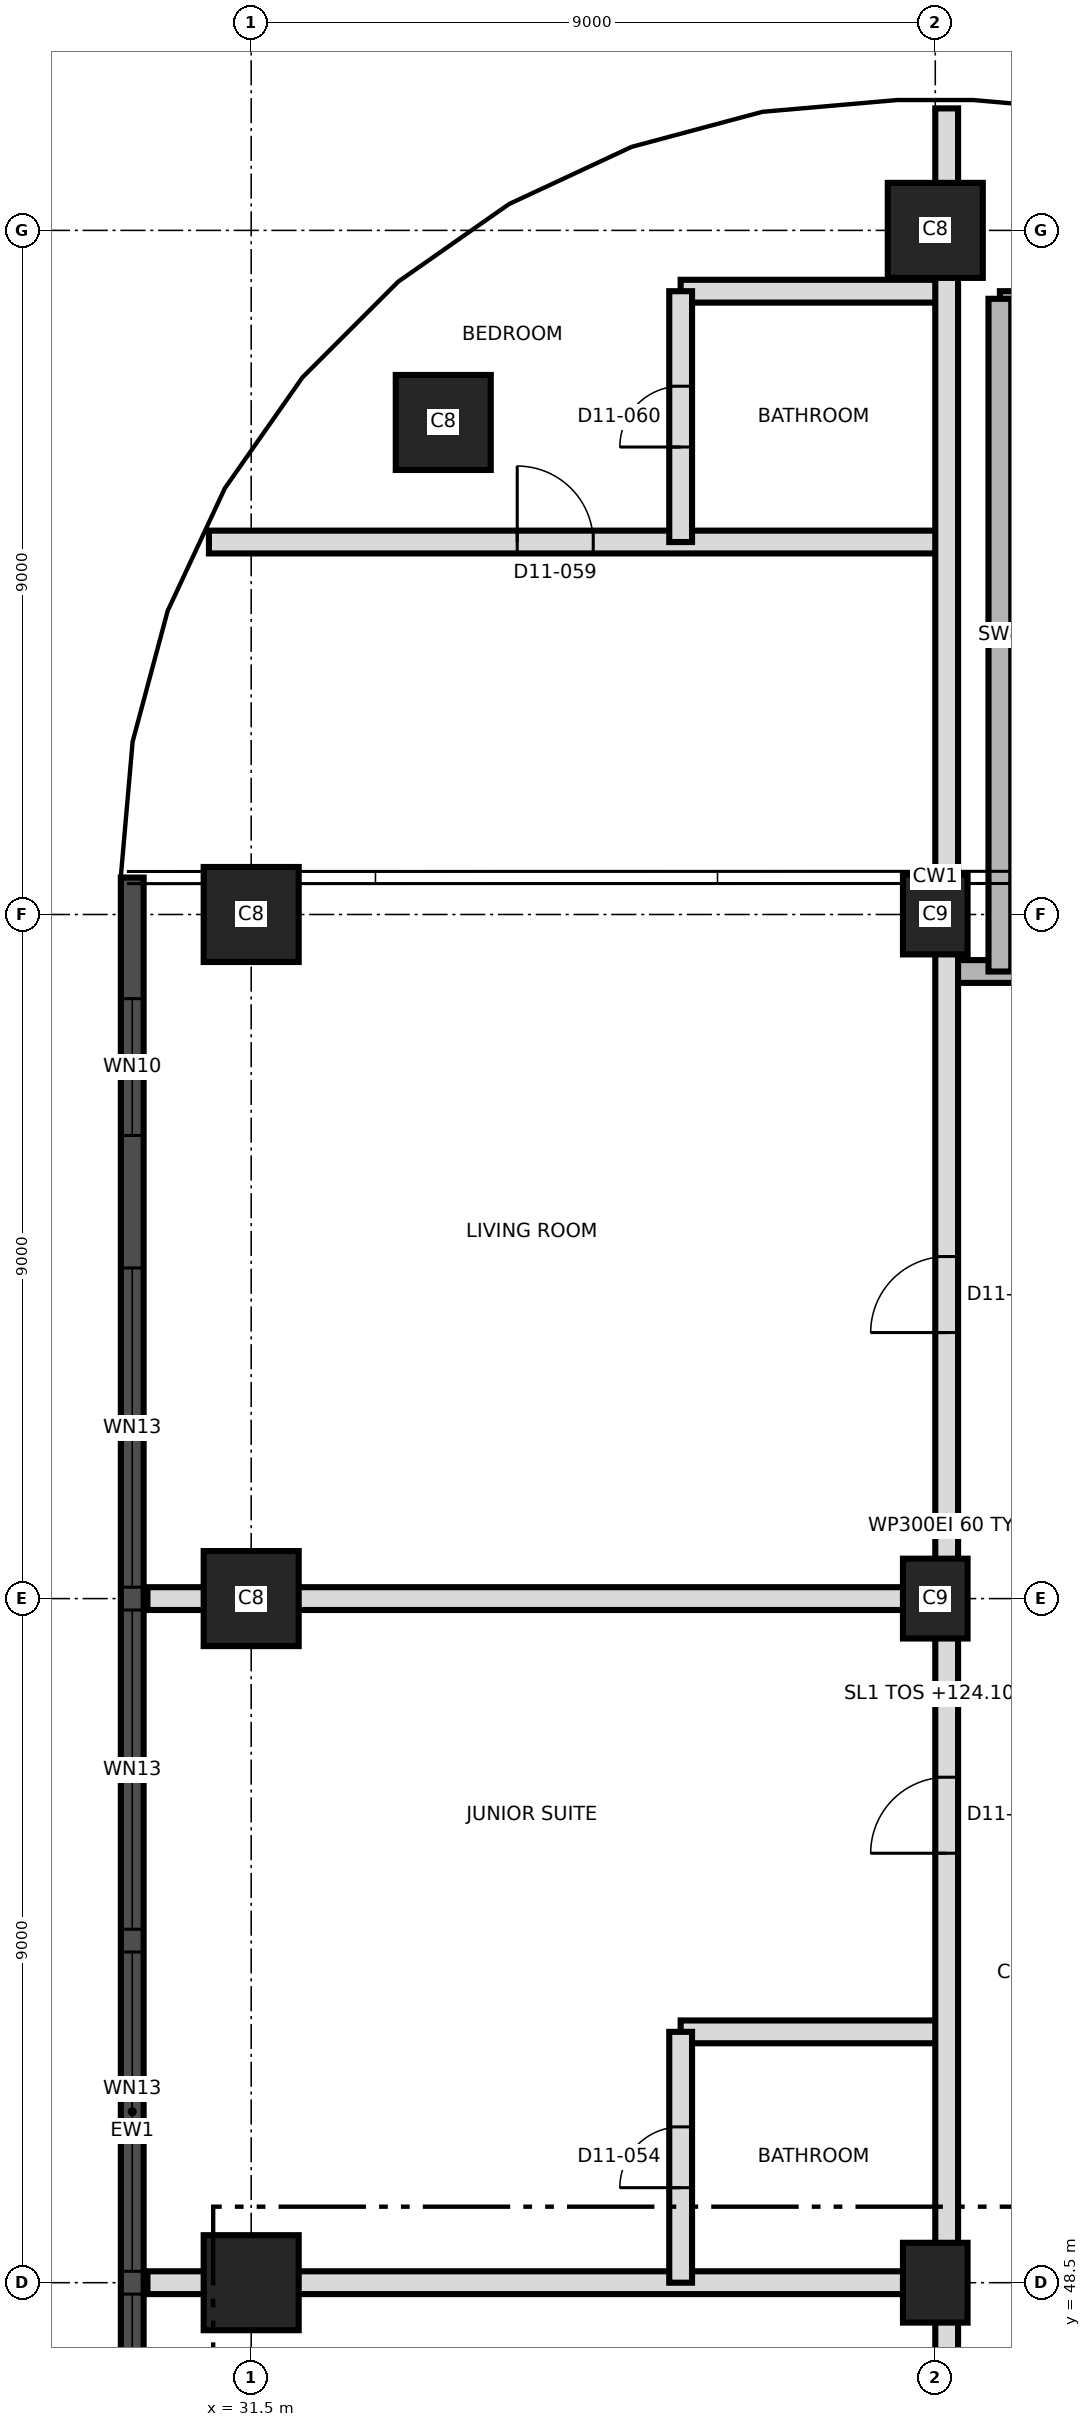
"""IFC4 building model, lengths in metres.
Left out: names, types, materials, properties, quantities, classifications, styles, units other than length and angle.
Written with IfcOpenShell. Run it as: python <this file> out.ifc"""

import sys

from ifc_helpers import new_model, si_unit, direction, frame, frame_2d, origin, origin_2d, place, context, subcontext, project, spatial, rectangle, extrude, element, fill, save


model = new_model("IFC4")
c1 = context("Model", 3, precision=1e-05, world=origin(), true_north=direction((0.0, 1.0)))
c2 = subcontext(c1, "Body", "Model", "MODEL_VIEW")
j1 = project(units=[si_unit("LENGTHUNIT", "METRE"), si_unit("PLANEANGLEUNIT", "RADIAN")], contexts=[c1])
p1 = place(None, origin())
s1 = spatial("IfcSite", under=j1, at=p1, CompositionType="ELEMENT")
p2 = place(p1, origin())
s2 = spatial("IfcBuilding", under=s1, at=p2, CompositionType="ELEMENT")
p3 = place(p2, frame((0.0, 0.0, 124.1)))
s3 = spatial("IfcBuildingStorey", under=s2, at=p3, CompositionType="ELEMENT", Elevation=124.1)
p4 = place(p3, frame((31.5, 48.5, 0.0), z_axis=(0.0, 0.0, 1.0), x_axis=(1.0, 0.0, 0.0)))
e1 = element("IfcColumn", 1, at=p4, inside=s3, PredefinedType="COLUMN", context=c2, shape_type="SweptSolid", body=[
    extrude(rectangle(XDim=1.25, YDim=1.25, at=origin_2d()), origin(), (0.0, 0.0, 1.0), 3.7),
])
p5 = place(p3, frame((40.5, 48.5, 0.0), z_axis=(0.0, 0.0, 1.0), x_axis=(0.0, 1.0, 0.0)))
e2 = element("IfcColumn", 2, at=p5, inside=s3, PredefinedType="COLUMN", context=c2, shape_type="SweptSolid", body=[
    extrude(rectangle(XDim=1.05, YDim=0.85, at=origin_2d()), origin(), (0.0, 0.0, 1.0), 3.7),
])
p6 = place(p3, frame((31.5, 57.5, 0.0), z_axis=(0.0, 0.0, 1.0), x_axis=(1.0, 0.0, 0.0)))
e3 = element("IfcColumn", 3, at=p6, inside=s3, PredefinedType="COLUMN", context=c2, shape_type="SweptSolid", body=[
    extrude(rectangle(XDim=1.25, YDim=1.25, at=origin_2d()), origin(), (0.0, 0.0, 1.0), 3.7),
])
p7 = place(p3, frame((40.5, 57.5, 0.0), z_axis=(0.0, 0.0, 1.0), x_axis=(0.0, 1.0, 0.0)))
e4 = element("IfcColumn", 4, at=p7, inside=s3, PredefinedType="COLUMN", context=c2, shape_type="SweptSolid", body=[
    extrude(rectangle(XDim=1.05, YDim=0.85, at=origin_2d()), origin(), (0.0, 0.0, 1.0), 3.7),
])
p8 = place(p3, frame((31.5, 66.5, 0.0), z_axis=(0.0, 0.0, 1.0), x_axis=(1.0, 0.0, 0.0)))
e5 = element("IfcColumn", 5, at=p8, inside=s3, PredefinedType="COLUMN", context=c2, shape_type="SweptSolid", body=[
    extrude(rectangle(XDim=1.25, YDim=1.25, at=origin_2d()), origin(), (0.0, 0.0, 1.0), 3.7),
])
p9 = place(p3, frame((40.5, 66.5, 0.0), z_axis=(0.0, 0.0, 1.0), x_axis=(0.0, 1.0, 0.0)))
e6 = element("IfcColumn", 6, at=p9, inside=s3, PredefinedType="COLUMN", context=c2, shape_type="SweptSolid", body=[
    extrude(rectangle(XDim=1.05, YDim=0.85, at=origin_2d()), origin(), (0.0, 0.0, 1.0), 3.7),
])
for number, where, z_axis, x_axis in (
    (7, (34.027, 72.973, 0.0), (0.0, 0.0, 1.0), (1.0, 0.0, 0.0)),
    (8, (40.5, 75.5, 0.0), (0.0, 0.0, 1.0), (1.0, 0.0, 0.0)),
):
    element("IfcColumn", number, at=place(p3, frame(where, z_axis=z_axis, x_axis=x_axis)), inside=s3, PredefinedType="COLUMN", context=c2, shape_type="SweptSolid", body=[
        extrude(rectangle(XDim=1.25, YDim=1.25, at=origin_2d()), origin(), (0.0, 0.0, 1.0), 3.7),
    ])
p10 = place(p3, frame((29.935, 66.986, 0.0), z_axis=(0.0, 0.0, 1.0), x_axis=(0.0, -1.0, 0.0)))
e9 = element("IfcWall", 9, at=p10, inside=s3, PredefinedType="SOLIDWALL", context=c2, shape_type="SweptSolid", body=[
    extrude(rectangle(XDim=32.976, YDim=0.3, at=frame_2d((16.488, 0.0))), origin(), (0.0, 0.0, 1.0), 3.4),
])
p11 = place(p10, frame((1.593, 0.0, 0.3)))
e10 = element("IfcOpeningElement", 10, at=p11, cuts=e9, PredefinedType="OPENING", context=c2, shape_type="SweptSolid", body=[
    extrude(rectangle(XDim=1.8, YDim=2.4, at=frame_2d((0.9, 1.2))), frame((0.0, 0.16, 0.0), z_axis=(0.0, -1.0, 0.0), x_axis=(1.0, 0.0, 0.0)), (0.0, 0.0, 1.0), 0.32),
])
p12 = place(p10, frame((5.136, 0.0, 0.9)))
e11 = element("IfcOpeningElement", 11, at=p12, cuts=e9, PredefinedType="OPENING", context=c2, shape_type="SweptSolid", body=[
    extrude(rectangle(XDim=4.2, YDim=1.7, at=frame_2d((2.1, 0.85))), frame((0.0, 0.16, 0.0), z_axis=(0.0, -1.0, 0.0), x_axis=(1.0, 0.0, 0.0)), (0.0, 0.0, 1.0), 0.32),
])
p13 = place(p10, frame((9.636, 0.0, 0.9)))
e12 = element("IfcOpeningElement", 12, at=p13, cuts=e9, PredefinedType="OPENING", context=c2, shape_type="SweptSolid", body=[
    extrude(rectangle(XDim=4.2, YDim=1.7, at=frame_2d((2.1, 0.85))), frame((0.0, 0.16, 0.0), z_axis=(0.0, -1.0, 0.0), x_axis=(1.0, 0.0, 0.0)), (0.0, 0.0, 1.0), 0.32),
])
p14 = place(p10, frame((14.136, 0.0, 0.9)))
e13 = element("IfcOpeningElement", 13, at=p14, cuts=e9, PredefinedType="OPENING", context=c2, shape_type="SweptSolid", body=[
    extrude(rectangle(XDim=4.2, YDim=1.7, at=frame_2d((2.1, 0.85))), frame((0.0, 0.16, 0.0), z_axis=(0.0, -1.0, 0.0), x_axis=(1.0, 0.0, 0.0)), (0.0, 0.0, 1.0), 0.32),
])
p15 = place(p10, frame((18.636, 0.0, 0.9)))
e14 = element("IfcOpeningElement", 14, at=p15, cuts=e9, PredefinedType="OPENING", context=c2, shape_type="SweptSolid", body=[
    extrude(rectangle(XDim=4.2, YDim=1.7, at=frame_2d((2.1, 0.85))), frame((0.0, 0.16, 0.0), z_axis=(0.0, -1.0, 0.0), x_axis=(1.0, 0.0, 0.0)), (0.0, 0.0, 1.0), 0.32),
])
p16 = place(p10, frame((23.136, 0.0, 0.9)))
e15 = element("IfcOpeningElement", 15, at=p16, cuts=e9, PredefinedType="OPENING", context=c2, shape_type="SweptSolid", body=[
    extrude(rectangle(XDim=4.2, YDim=1.7, at=frame_2d((2.1, 0.85))), frame((0.0, 0.16, 0.0), z_axis=(0.0, -1.0, 0.0), x_axis=(1.0, 0.0, 0.0)), (0.0, 0.0, 1.0), 0.32),
])
p17 = place(p10, frame((29.331, 0.0, 0.3)))
e16 = element("IfcOpeningElement", 16, at=p17, cuts=e9, PredefinedType="OPENING", context=c2, shape_type="SweptSolid", body=[
    extrude(rectangle(XDim=1.8, YDim=2.4, at=frame_2d((0.9, 1.2))), frame((0.0, 0.16, 0.0), z_axis=(0.0, -1.0, 0.0), x_axis=(1.0, 0.0, 0.0)), (0.0, 0.0, 1.0), 0.32),
])
p18 = place(p3, frame((30.135, 48.5, 0.0), z_axis=(0.0, 0.0, 1.0), x_axis=(1.0, 0.0, 0.0)))
e17 = element("IfcWall", 17, at=p18, inside=s3, PredefinedType="PARTITIONING", context=c2, shape_type="SweptSolid", body=[
    extrude(rectangle(XDim=10.515, YDim=0.3, at=frame_2d((5.257, 0.0))), origin(), (0.0, 0.0, 1.0), 3.4),
])
p19 = place(p3, frame((37.15, 51.8, 0.0), z_axis=(0.0, 0.0, 1.0), x_axis=(1.0, 0.0, 0.0)))
e18 = element("IfcWall", 18, at=p19, inside=s3, PredefinedType="PARTITIONING", context=c2, shape_type="SweptSolid", body=[
    extrude(rectangle(XDim=3.5, YDim=0.3, at=frame_2d((1.75, 0.0))), origin(), (0.0, 0.0, 1.0), 3.4),
])
p20 = place(p3, frame((30.135, 57.5, 0.0), z_axis=(0.0, 0.0, 1.0), x_axis=(1.0, 0.0, 0.0)))
e19 = element("IfcWall", 19, at=p20, inside=s3, PredefinedType="PARTITIONING", context=c2, shape_type="SweptSolid", body=[
    extrude(rectangle(XDim=10.515, YDim=0.3, at=frame_2d((5.257, 0.0))), origin(), (0.0, 0.0, 1.0), 3.4),
])
p21 = place(p3, frame((40.65, 65.75, 0.0), z_axis=(0.0, 0.0, 1.0), x_axis=(1.0, 0.0, 0.0)))
e20 = element("IfcWall", 20, at=p21, inside=s3, PredefinedType="SHEAR", context=c2, shape_type="SweptSolid", body=[
    extrude(rectangle(XDim=3.7, YDim=0.3, at=frame_2d((1.85, 0.0))), origin(), (0.0, 0.0, 1.0), 3.4),
])
p22 = place(p21, frame((1.1, 0.0, 0.0)))
e21 = element("IfcOpeningElement", 21, at=p22, cuts=e20, PredefinedType="OPENING", context=c2, shape_type="SweptSolid", body=[
    extrude(rectangle(XDim=1.2, YDim=2.1, at=frame_2d((0.6, 1.05))), frame((0.0, 0.16, 0.0), z_axis=(0.0, -1.0, 0.0), x_axis=(1.0, 0.0, 0.0)), (0.0, 0.0, 1.0), 0.32),
])
p23 = place(p3, frame((30.944, 71.4, 0.0), z_axis=(0.0, 0.0, 1.0), x_axis=(1.0, 0.0, 0.0)))
e22 = element("IfcWall", 22, at=p23, inside=s3, PredefinedType="PARTITIONING", context=c2, shape_type="SweptSolid", body=[
    extrude(rectangle(XDim=9.706, YDim=0.3, at=frame_2d((4.853, 0.0))), origin(), (0.0, 0.0, 1.0), 3.4),
])
p24 = place(p23, frame((4.056, 0.0, 0.0)))
e23 = element("IfcOpeningElement", 23, at=p24, cuts=e22, PredefinedType="OPENING", context=c2, shape_type="SweptSolid", body=[
    extrude(rectangle(XDim=1.0, YDim=2.1, at=frame_2d((0.5, 1.05))), frame((0.0, 0.16, 0.0), z_axis=(0.0, -1.0, 0.0), x_axis=(1.0, 0.0, 0.0)), (0.0, 0.0, 1.0), 0.32),
])
p25 = place(p3, frame((41.35, 74.55, 0.0), z_axis=(0.0, 0.0, 1.0), x_axis=(1.0, 0.0, 0.0)))
e24 = element("IfcWall", 24, at=p25, inside=s3, PredefinedType="SHEAR", context=c2, shape_type="SweptSolid", body=[
    extrude(rectangle(XDim=3.0, YDim=0.3, at=frame_2d((1.5, 0.0))), origin(), (0.0, 0.0, 1.0), 3.4),
])
p26 = place(p3, frame((37.15, 74.7, 0.0), z_axis=(0.0, 0.0, 1.0), x_axis=(1.0, 0.0, 0.0)))
e25 = element("IfcWall", 25, at=p26, inside=s3, PredefinedType="PARTITIONING", context=c2, shape_type="SweptSolid", body=[
    extrude(rectangle(XDim=3.5, YDim=0.3, at=frame_2d((1.75, 0.0))), origin(), (0.0, 0.0, 1.0), 3.4),
])
p27 = place(p3, frame((37.15, 48.5, 0.0), z_axis=(0.0, 0.0, 1.0), x_axis=(0.0, 1.0, 0.0)))
e26 = element("IfcWall", 26, at=p27, inside=s3, PredefinedType="PARTITIONING", context=c2, shape_type="SweptSolid", body=[
    extrude(rectangle(XDim=3.3, YDim=0.3, at=frame_2d((1.65, 0.0))), origin(), (0.0, 0.0, 1.0), 3.4),
])
p28 = place(p27, frame((1.25, 0.0, 0.0)))
e27 = element("IfcOpeningElement", 27, at=p28, cuts=e26, PredefinedType="OPENING", context=c2, shape_type="SweptSolid", body=[
    extrude(rectangle(XDim=0.8, YDim=2.1, at=frame_2d((0.4, 1.05))), frame((0.0, 0.16, 0.0), z_axis=(0.0, -1.0, 0.0), x_axis=(1.0, 0.0, 0.0)), (0.0, 0.0, 1.0), 0.32),
])
p29 = place(p3, frame((37.15, 71.4, 0.0), z_axis=(0.0, 0.0, 1.0), x_axis=(0.0, 1.0, 0.0)))
e28 = element("IfcWall", 28, at=p29, inside=s3, PredefinedType="PARTITIONING", context=c2, shape_type="SweptSolid", body=[
    extrude(rectangle(XDim=3.3, YDim=0.3, at=frame_2d((1.65, 0.0))), origin(), (0.0, 0.0, 1.0), 3.4),
])
p30 = place(p29, frame((1.25, 0.0, 0.0)))
e29 = element("IfcOpeningElement", 29, at=p30, cuts=e28, PredefinedType="OPENING", context=c2, shape_type="SweptSolid", body=[
    extrude(rectangle(XDim=0.8, YDim=2.1, at=frame_2d((0.4, 1.05))), frame((0.0, 0.16, 0.0), z_axis=(0.0, -1.0, 0.0), x_axis=(1.0, 0.0, 0.0)), (0.0, 0.0, 1.0), 0.32),
])
p31 = place(p3, frame((40.65, 39.8, 0.0), z_axis=(0.0, 0.0, 1.0), x_axis=(0.0, 1.0, 0.0)))
e30 = element("IfcWall", 30, at=p31, inside=s3, PredefinedType="PARTITIONING", context=c2, shape_type="SweptSolid", body=[
    extrude(rectangle(XDim=37.305, YDim=0.3, at=frame_2d((18.652, 0.0))), origin(), (0.0, 0.0, 1.0), 3.4),
])
p32 = place(p31, frame((0.85, 0.0, 0.0)))
e31 = element("IfcOpeningElement", 31, at=p32, cuts=e30, PredefinedType="OPENING", context=c2, shape_type="SweptSolid", body=[
    extrude(rectangle(XDim=1.0, YDim=2.1, at=frame_2d((0.5, 1.05))), frame((0.0, 0.16, 0.0), z_axis=(0.0, -1.0, 0.0), x_axis=(1.0, 0.0, 0.0)), (0.0, 0.0, 1.0), 0.32),
])
p33 = place(p31, frame((6.7, 0.0, 0.0)))
e32 = element("IfcOpeningElement", 32, at=p33, cuts=e30, PredefinedType="OPENING", context=c2, shape_type="SweptSolid", body=[
    extrude(rectangle(XDim=1.0, YDim=2.1, at=frame_2d((0.5, 1.05))), frame((0.0, 0.16, 0.0), z_axis=(0.0, -1.0, 0.0), x_axis=(1.0, 0.0, 0.0)), (0.0, 0.0, 1.0), 0.32),
])
p34 = place(p31, frame((14.35, 0.0, 0.0)))
e33 = element("IfcOpeningElement", 33, at=p34, cuts=e30, PredefinedType="OPENING", context=c2, shape_type="SweptSolid", body=[
    extrude(rectangle(XDim=1.0, YDim=2.4, at=frame_2d((0.5, 1.2))), frame((0.0, 0.16, 0.0), z_axis=(0.0, -1.0, 0.0), x_axis=(1.0, 0.0, 0.0)), (0.0, 0.0, 1.0), 0.32),
])
p35 = place(p31, frame((21.2, 0.0, 0.0)))
e34 = element("IfcOpeningElement", 34, at=p35, cuts=e30, PredefinedType="OPENING", context=c2, shape_type="SweptSolid", body=[
    extrude(rectangle(XDim=1.0, YDim=2.4, at=frame_2d((0.5, 1.2))), frame((0.0, 0.16, 0.0), z_axis=(0.0, -1.0, 0.0), x_axis=(1.0, 0.0, 0.0)), (0.0, 0.0, 1.0), 0.32),
])
p36 = place(p3, frame((41.35, 65.75, 0.0), z_axis=(0.0, 0.0, 1.0), x_axis=(0.0, 1.0, 0.0)))
e35 = element("IfcWall", 35, at=p36, inside=s3, PredefinedType="SHEAR", context=c2, shape_type="SweptSolid", body=[
    extrude(rectangle(XDim=8.85, YDim=0.3, at=frame_2d((4.425, 0.0))), origin(), (0.0, 0.0, 1.0), 3.4),
])
p37 = place(p11, origin())
e36 = element("IfcWindow", 36, at=p37, inside=s3, PartitioningType="SINGLE_PANEL", PredefinedType="WINDOW", context=c2, shape_type="SweptSolid", body=[
    extrude(rectangle(XDim=1.8, YDim=2.4, at=frame_2d((0.9, 1.2))), frame((0.0, 0.03, 0.0), z_axis=(0.0, -1.0, 0.0), x_axis=(1.0, 0.0, 0.0)), (0.0, 0.0, 1.0), 0.06),
])
fill(e10, e36)
p38 = place(p12, origin())
e37 = element("IfcWindow", 37, at=p38, inside=s3, PartitioningType="SINGLE_PANEL", PredefinedType="WINDOW", context=c2, shape_type="SweptSolid", body=[
    extrude(rectangle(XDim=4.2, YDim=1.7, at=frame_2d((2.1, 0.85))), frame((0.0, 0.03, 0.0), z_axis=(0.0, -1.0, 0.0), x_axis=(1.0, 0.0, 0.0)), (0.0, 0.0, 1.0), 0.06),
])
fill(e11, e37)
p39 = place(p13, origin())
e38 = element("IfcWindow", 38, at=p39, inside=s3, PartitioningType="SINGLE_PANEL", PredefinedType="WINDOW", context=c2, shape_type="SweptSolid", body=[
    extrude(rectangle(XDim=4.2, YDim=1.7, at=frame_2d((2.1, 0.85))), frame((0.0, 0.03, 0.0), z_axis=(0.0, -1.0, 0.0), x_axis=(1.0, 0.0, 0.0)), (0.0, 0.0, 1.0), 0.06),
])
fill(e12, e38)
p40 = place(p14, origin())
e39 = element("IfcWindow", 39, at=p40, inside=s3, PartitioningType="SINGLE_PANEL", PredefinedType="WINDOW", context=c2, shape_type="SweptSolid", body=[
    extrude(rectangle(XDim=4.2, YDim=1.7, at=frame_2d((2.1, 0.85))), frame((0.0, 0.03, 0.0), z_axis=(0.0, -1.0, 0.0), x_axis=(1.0, 0.0, 0.0)), (0.0, 0.0, 1.0), 0.06),
])
fill(e13, e39)
p41 = place(p15, origin())
e40 = element("IfcWindow", 40, at=p41, inside=s3, PartitioningType="SINGLE_PANEL", PredefinedType="WINDOW", context=c2, shape_type="SweptSolid", body=[
    extrude(rectangle(XDim=4.2, YDim=1.7, at=frame_2d((2.1, 0.85))), frame((0.0, 0.03, 0.0), z_axis=(0.0, -1.0, 0.0), x_axis=(1.0, 0.0, 0.0)), (0.0, 0.0, 1.0), 0.06),
])
fill(e14, e40)
p42 = place(p28, origin())
e41 = element("IfcDoor", 41, at=p42, inside=s3, OperationType="SINGLE_SWING_LEFT", PredefinedType="DOOR", context=c2, shape_type="SweptSolid", body=[
    extrude(rectangle(XDim=0.8, YDim=2.1, at=frame_2d((0.4, 1.05))), frame((0.0, 0.025, 0.0), z_axis=(0.0, -1.0, 0.0), x_axis=(1.0, 0.0, 0.0)), (0.0, 0.0, 1.0), 0.05),
])
fill(e27, e41)
p43 = place(p34, origin())
e42 = element("IfcDoor", 42, at=p43, inside=s3, OperationType="SINGLE_SWING_LEFT", PredefinedType="DOOR", context=c2, shape_type="SweptSolid", body=[
    extrude(rectangle(XDim=1.0, YDim=2.4, at=frame_2d((0.5, 1.2))), frame((0.0, 0.025, 0.0), z_axis=(0.0, -1.0, 0.0), x_axis=(1.0, 0.0, 0.0)), (0.0, 0.0, 1.0), 0.05),
])
fill(e33, e42)
p44 = place(p35, origin())
e43 = element("IfcDoor", 43, at=p44, inside=s3, OperationType="SINGLE_SWING_LEFT", PredefinedType="DOOR", context=c2, shape_type="SweptSolid", body=[
    extrude(rectangle(XDim=1.0, YDim=2.4, at=frame_2d((0.5, 1.2))), frame((0.0, 0.025, 0.0), z_axis=(0.0, -1.0, 0.0), x_axis=(1.0, 0.0, 0.0)), (0.0, 0.0, 1.0), 0.05),
])
fill(e34, e43)
p45 = place(p24, origin())
e44 = element("IfcDoor", 44, at=p45, inside=s3, OperationType="SINGLE_SWING_RIGHT", PredefinedType="DOOR", context=c2, shape_type="SweptSolid", body=[
    extrude(rectangle(XDim=1.0, YDim=2.1, at=frame_2d((0.5, 1.05))), frame((0.0, 0.025, 0.0), z_axis=(0.0, -1.0, 0.0), x_axis=(1.0, 0.0, 0.0)), (0.0, 0.0, 1.0), 0.05),
])
fill(e23, e44)
p46 = place(p30, origin())
e45 = element("IfcDoor", 45, at=p46, inside=s3, OperationType="SINGLE_SWING_LEFT", PredefinedType="DOOR", context=c2, shape_type="SweptSolid", body=[
    extrude(rectangle(XDim=0.8, YDim=2.1, at=frame_2d((0.4, 1.05))), frame((0.0, 0.025, 0.0), z_axis=(0.0, -1.0, 0.0), x_axis=(1.0, 0.0, 0.0)), (0.0, 0.0, 1.0), 0.05),
])
fill(e29, e45)
save(model, sys.argv[1])
